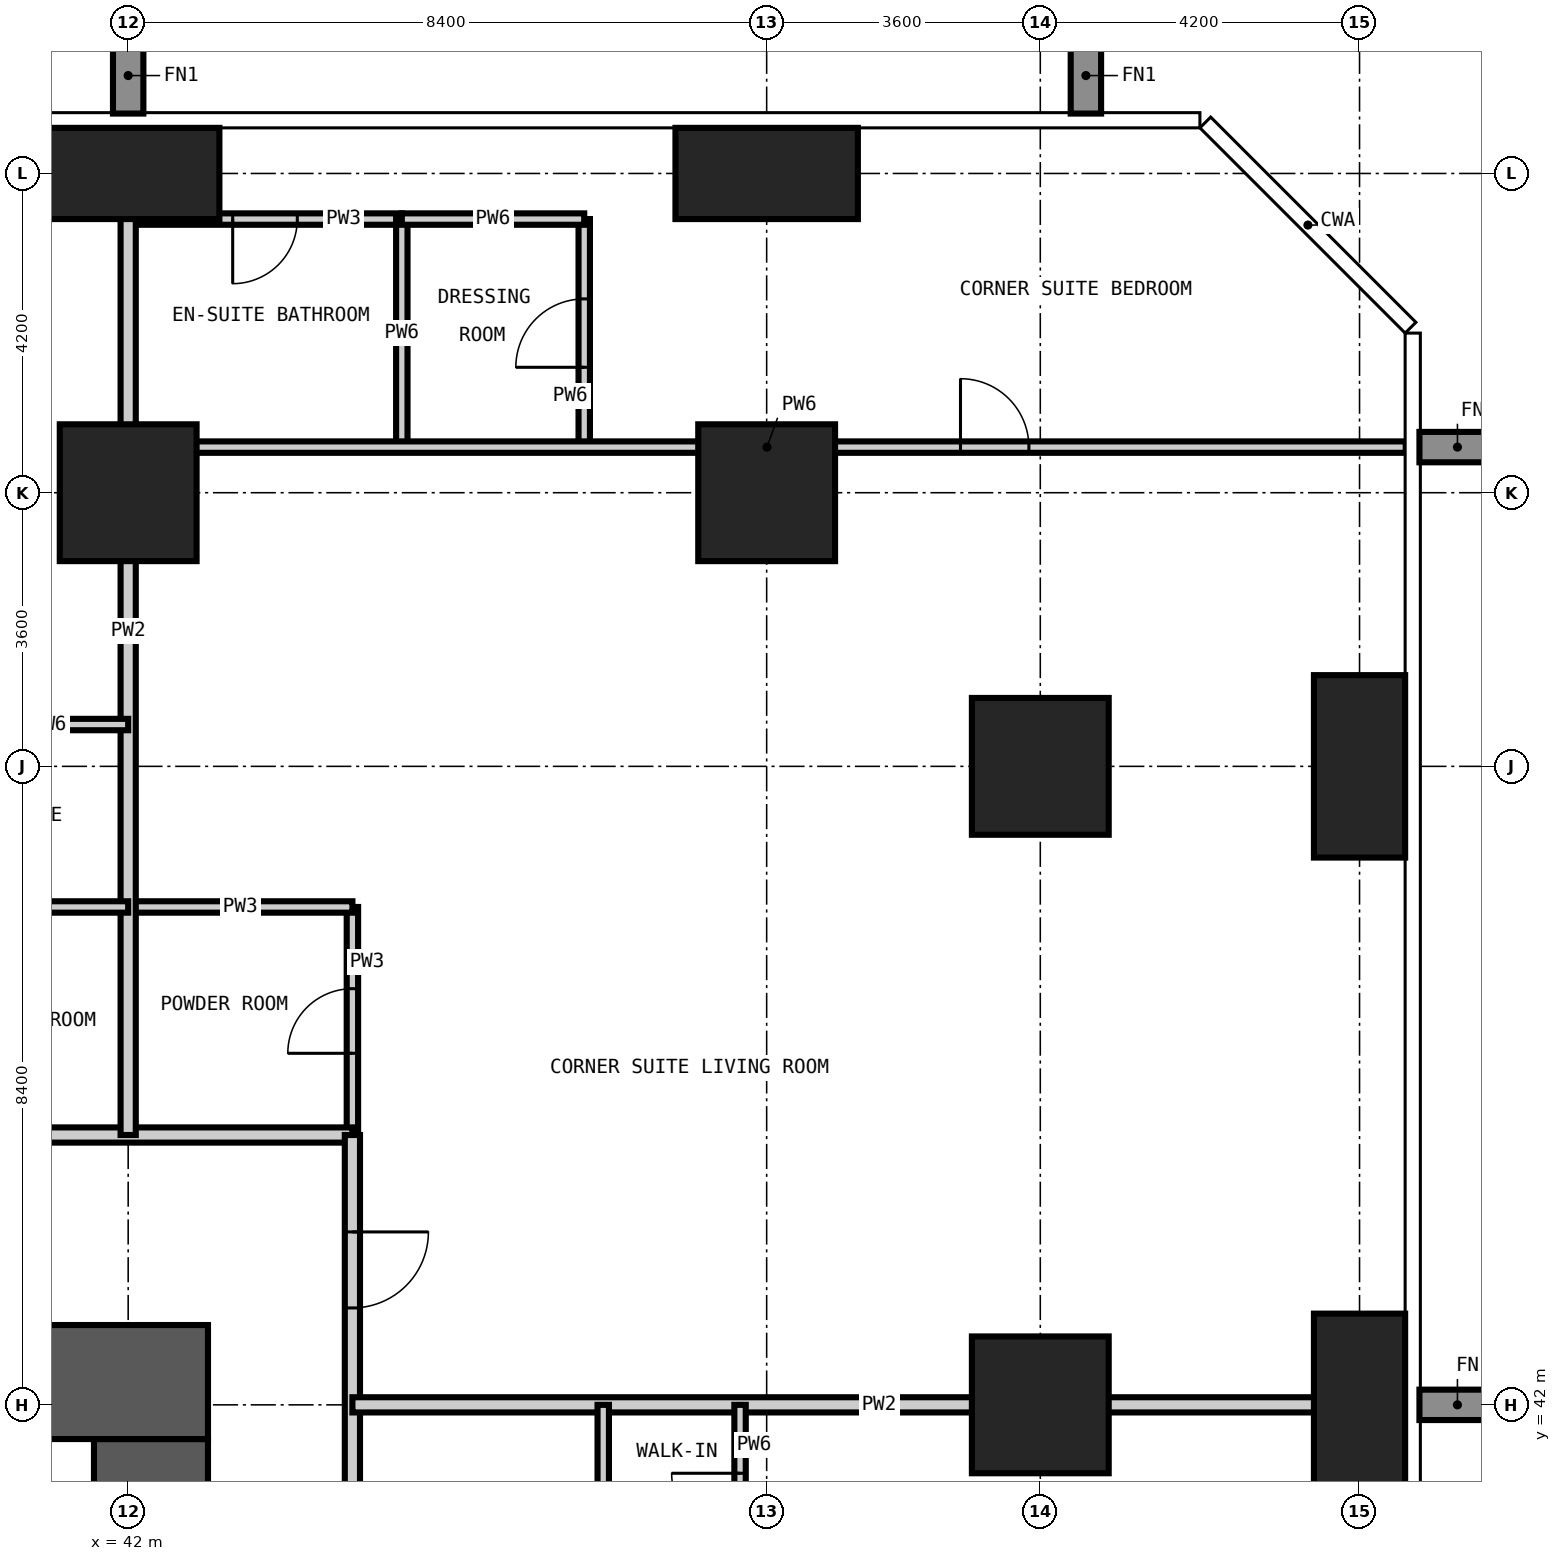
"""IFC4 building model, lengths in metres.
Left out: names, types, materials, properties, quantities, classifications, styles, units other than length and angle.
Written with IfcOpenShell. Run it as: python <this file> out.ifc"""

import sys

from ifc_helpers import new_model, si_unit, direction, frame, frame_2d, origin, origin_2d, place, context, subcontext, project, spatial, rectangle, extrude, element, fill, save


model = new_model("IFC4")
c1 = context("Model", 3, precision=1e-05, world=origin(), true_north=direction((0.0, 1.0)))
c2 = subcontext(c1, "Body", "Model", "MODEL_VIEW")
j1 = project(units=[si_unit("LENGTHUNIT", "METRE"), si_unit("PLANEANGLEUNIT", "RADIAN")], contexts=[c1])
p1 = place(None, origin())
s1 = spatial("IfcSite", under=j1, at=p1, CompositionType="ELEMENT")
p2 = place(p1, origin())
s2 = spatial("IfcBuilding", under=s1, at=p2, CompositionType="ELEMENT")
p3 = place(p2, frame((0.0, 0.0, 52.2)))
s3 = spatial("IfcBuildingStorey", under=s2, at=p3, CompositionType="ELEMENT", Elevation=52.2)
p4 = place(p3, frame((42.0, 54.0, -0.35), z_axis=(0.0, 0.0, 1.0), x_axis=(1.0, 0.0, 0.0)))
e1 = element("IfcColumn", 1, at=p4, inside=s3, PredefinedType="COLUMN", context=c2, shape_type="SweptSolid", body=[
    extrude(rectangle(XDim=1.8, YDim=1.8, at=origin_2d()), origin(), (0.0, 0.0, 1.0), 3.6),
])
p5 = place(p3, frame((42.0, 58.2, -0.35), z_axis=(0.0, 0.0, 1.0), x_axis=(1.0, 0.0, 0.0)))
e2 = element("IfcColumn", 2, at=p5, inside=s3, PredefinedType="COLUMN", context=c2, shape_type="SweptSolid", body=[
    extrude(rectangle(XDim=2.4, YDim=1.2, at=origin_2d()), origin(), (0.0, 0.0, 1.0), 3.6),
])
p6 = place(p3, frame((50.4, 54.0, -0.35), z_axis=(0.0, 0.0, 1.0), x_axis=(1.0, 0.0, 0.0)))
e3 = element("IfcColumn", 3, at=p6, inside=s3, PredefinedType="COLUMN", context=c2, shape_type="SweptSolid", body=[
    extrude(rectangle(XDim=1.8, YDim=1.8, at=origin_2d()), origin(), (0.0, 0.0, 1.0), 3.6),
])
p7 = place(p3, frame((50.4, 58.2, -0.35), z_axis=(0.0, 0.0, 1.0), x_axis=(1.0, 0.0, 0.0)))
e4 = element("IfcColumn", 4, at=p7, inside=s3, PredefinedType="COLUMN", context=c2, shape_type="SweptSolid", body=[
    extrude(rectangle(XDim=2.4, YDim=1.2, at=origin_2d()), origin(), (0.0, 0.0, 1.0), 3.6),
])
for number, where, z_axis, x_axis in (
    (5, (54.0, 42.0, -0.35), (0.0, 0.0, 1.0), (1.0, 0.0, 0.0)),
    (6, (54.0, 50.4, -0.35), (0.0, 0.0, 1.0), (1.0, 0.0, 0.0)),
):
    element("IfcColumn", number, at=place(p3, frame(where, z_axis=z_axis, x_axis=x_axis)), inside=s3, PredefinedType="COLUMN", context=c2, shape_type="SweptSolid", body=[
        extrude(rectangle(XDim=1.8, YDim=1.8, at=origin_2d()), origin(), (0.0, 0.0, 1.0), 3.6),
    ])
for number, where, z_axis, x_axis in (
    (7, (58.2, 42.0, -0.35), (0.0, 0.0, 1.0), (1.0, 0.0, 0.0)),
    (8, (58.2, 50.4, -0.35), (0.0, 0.0, 1.0), (1.0, 0.0, 0.0)),
):
    element("IfcColumn", number, at=place(p3, frame(where, z_axis=z_axis, x_axis=x_axis)), inside=s3, PredefinedType="COLUMN", context=c2, shape_type="SweptSolid", body=[
        extrude(rectangle(XDim=1.2, YDim=2.4, at=origin_2d()), origin(), (0.0, 0.0, 1.0), 3.6),
    ])
p8 = place(p3, frame((42.3, 17.25, -0.35), z_axis=(0.0, 0.0, 1.0), x_axis=(0.0, 1.0, 0.0)))
e9 = element("IfcWall", 9, at=p8, inside=s3, PredefinedType="SHEAR", context=c2, shape_type="SweptSolid", body=[
    extrude(rectangle(XDim=24.3, YDim=1.5, at=frame_2d((12.15, 0.0))), origin(), (0.0, 0.0, 1.0), 3.6),
])
p9 = place(p8, frame((0.35, 0.0, 0.35)))
e10 = element("IfcOpeningElement", 10, at=p9, cuts=e9, PredefinedType="OPENING", context=c2, shape_type="SweptSolid", body=[
    extrude(rectangle(XDim=1.2, YDim=2.2, at=frame_2d((0.6, 1.1))), frame((0.0, 0.76, 0.0), z_axis=(0.0, -1.0, 0.0), x_axis=(1.0, 0.0, 0.0)), (0.0, 0.0, 1.0), 1.52),
])
p10 = place(p8, frame((11.65, 0.0, 0.35)))
e11 = element("IfcOpeningElement", 11, at=p10, cuts=e9, PredefinedType="OPENING", context=c2, shape_type="SweptSolid", body=[
    extrude(rectangle(XDim=1.0, YDim=2.1, at=frame_2d((0.5, 1.05))), frame((0.0, 0.76, 0.0), z_axis=(0.0, -1.0, 0.0), x_axis=(1.0, 0.0, 0.0)), (0.0, 0.0, 1.0), 1.52),
])
p11 = place(p8, frame((20.05, 0.0, 0.35)))
e12 = element("IfcOpeningElement", 12, at=p11, cuts=e9, PredefinedType="OPENING", context=c2, shape_type="SweptSolid", body=[
    extrude(rectangle(XDim=1.0, YDim=2.1, at=frame_2d((0.5, 1.05))), frame((0.0, 0.76, 0.0), z_axis=(0.0, -1.0, 0.0), x_axis=(1.0, 0.0, 0.0)), (0.0, 0.0, 1.0), 1.52),
])
p12 = place(p3, frame((43.05, 42.3, -0.35), z_axis=(0.0, 0.0, 1.0), x_axis=(-1.0, 0.0, 0.0)))
e13 = element("IfcWall", 13, at=p12, inside=s3, PredefinedType="SHEAR", context=c2, shape_type="SweptSolid", body=[
    extrude(rectangle(XDim=27.3, YDim=1.5, at=frame_2d((13.65, 0.0))), origin(), (0.0, 0.0, 1.0), 3.6),
])
p13 = place(p12, frame((21.55, 0.0, 0.35)))
e14 = element("IfcOpeningElement", 14, at=p13, cuts=e13, PredefinedType="OPENING", context=c2, shape_type="SweptSolid", body=[
    extrude(rectangle(XDim=1.0, YDim=2.1, at=frame_2d((0.5, 1.05))), frame((0.0, 0.76, 0.0), z_axis=(0.0, -1.0, 0.0), x_axis=(1.0, 0.0, 0.0)), (0.0, 0.0, 1.0), 1.52),
])
p14 = place(p12, frame((10.95, 0.0, 0.35)))
e15 = element("IfcOpeningElement", 15, at=p14, cuts=e13, PredefinedType="OPENING", context=c2, shape_type="SweptSolid", body=[
    extrude(rectangle(XDim=1.2, YDim=2.2, at=frame_2d((0.6, 1.1))), frame((0.0, 0.76, 0.0), z_axis=(0.0, -1.0, 0.0), x_axis=(1.0, 0.0, 0.0)), (0.0, 0.0, 1.0), 1.52),
])
p15 = place(p3, frame((44.95, 45.55, 0.0), z_axis=(0.0, 0.0, 1.0), x_axis=(0.0, 1.0, 0.0)))
e16 = element("IfcWall", 16, at=p15, inside=s3, PredefinedType="PARTITIONING", context=c2, shape_type="SweptSolid", body=[
    extrude(rectangle(XDim=3.0, YDim=0.15, at=frame_2d((1.5, 0.0))), origin(), (0.0, 0.0, 1.0), 3.25),
])
p16 = place(p15, frame((1.075, 0.0, 0.0)))
e17 = element("IfcOpeningElement", 17, at=p16, cuts=e16, PredefinedType="OPENING", context=c2, shape_type="SweptSolid", body=[
    extrude(rectangle(XDim=0.85, YDim=2.1, at=frame_2d((0.425, 1.05))), frame((0.0, 0.085, 0.0), z_axis=(0.0, -1.0, 0.0), x_axis=(1.0, 0.0, 0.0)), (0.0, 0.0, 1.0), 0.17),
])
p17 = place(p3, frame((42.0, 48.55, 0.0), z_axis=(0.0, 0.0, 1.0), x_axis=(1.0, 0.0, 0.0)))
e18 = element("IfcWall", 18, at=p17, inside=s3, PredefinedType="PARTITIONING", context=c2, shape_type="SweptSolid", body=[
    extrude(rectangle(XDim=2.95, YDim=0.15, at=frame_2d((1.475, 0.0))), origin(), (0.0, 0.0, 1.0), 3.25),
])
p18 = place(p3, frame((42.0, 57.6, 0.0), z_axis=(0.0, 0.0, 1.0), x_axis=(1.0, 0.0, 0.0)))
e19 = element("IfcWall", 19, at=p18, inside=s3, PredefinedType="PARTITIONING", context=c2, shape_type="SweptSolid", body=[
    extrude(rectangle(XDim=3.6, YDim=0.15, at=frame_2d((1.8, 0.0))), origin(), (0.0, 0.0, 1.0), 3.25),
])
p19 = place(p18, frame((1.375, 0.0, 0.0)))
e20 = element("IfcOpeningElement", 20, at=p19, cuts=e19, PredefinedType="OPENING", context=c2, shape_type="SweptSolid", body=[
    extrude(rectangle(XDim=0.85, YDim=2.1, at=frame_2d((0.425, 1.05))), frame((0.0, 0.085, 0.0), z_axis=(0.0, -1.0, 0.0), x_axis=(1.0, 0.0, 0.0)), (0.0, 0.0, 1.0), 0.17),
])
p20 = place(p3, frame((12.65, 45.55, 0.0), z_axis=(0.0, 0.0, 1.0), x_axis=(1.0, 0.0, 0.0)))
e21 = element("IfcWall", 21, at=p20, inside=s3, PredefinedType="PARTITIONING", context=c2, shape_type="SweptSolid", body=[
    extrude(rectangle(XDim=32.3, YDim=0.2, at=frame_2d((16.15, 0.0))), origin(), (0.0, 0.0, 1.0), 3.25),
])
p21 = place(p20, frame((6.95, 0.0, 0.0)))
e22 = element("IfcOpeningElement", 22, at=p21, cuts=e21, PredefinedType="OPENING", context=c2, shape_type="SweptSolid", body=[
    extrude(rectangle(XDim=1.0, YDim=2.2, at=frame_2d((0.5, 1.1))), frame((0.0, 0.11, 0.0), z_axis=(0.0, -1.0, 0.0), x_axis=(1.0, 0.0, 0.0)), (0.0, 0.0, 1.0), 0.22),
])
p22 = place(p20, frame((15.35, 0.0, 0.0)))
e23 = element("IfcOpeningElement", 23, at=p22, cuts=e21, PredefinedType="OPENING", context=c2, shape_type="SweptSolid", body=[
    extrude(rectangle(XDim=1.0, YDim=2.2, at=frame_2d((0.5, 1.1))), frame((0.0, 0.11, 0.0), z_axis=(0.0, -1.0, 0.0), x_axis=(1.0, 0.0, 0.0)), (0.0, 0.0, 1.0), 0.22),
])
p23 = place(p20, frame((23.75, 0.0, 0.0)))
e24 = element("IfcOpeningElement", 24, at=p23, cuts=e21, PredefinedType="OPENING", context=c2, shape_type="SweptSolid", body=[
    extrude(rectangle(XDim=1.0, YDim=2.2, at=frame_2d((0.5, 1.1))), frame((0.0, 0.11, 0.0), z_axis=(0.0, -1.0, 0.0), x_axis=(1.0, 0.0, 0.0)), (0.0, 0.0, 1.0), 0.22),
])
p24 = place(p3, frame((44.95, 45.55, 0.0), z_axis=(0.0, 0.0, 1.0), x_axis=(0.0, -1.0, 0.0)))
e25 = element("IfcWall", 25, at=p24, inside=s3, PredefinedType="PARTITIONING", context=c2, shape_type="SweptSolid", body=[
    extrude(rectangle(XDim=32.9, YDim=0.2, at=frame_2d((16.45, 0.0))), origin(), (0.0, 0.0, 1.0), 3.25),
])
p25 = place(p24, frame((24.8, 0.0, 0.0)))
e26 = element("IfcOpeningElement", 26, at=p25, cuts=e25, PredefinedType="OPENING", context=c2, shape_type="SweptSolid", body=[
    extrude(rectangle(XDim=1.0, YDim=2.2, at=frame_2d((0.5, 1.1))), frame((0.0, 0.11, 0.0), z_axis=(0.0, -1.0, 0.0), x_axis=(1.0, 0.0, 0.0)), (0.0, 0.0, 1.0), 0.22),
])
p26 = place(p24, frame((19.85, 0.0, 0.0)))
e27 = element("IfcOpeningElement", 27, at=p26, cuts=e25, PredefinedType="OPENING", context=c2, shape_type="SweptSolid", body=[
    extrude(rectangle(XDim=1.0, YDim=2.2, at=frame_2d((0.5, 1.1))), frame((0.0, 0.11, 0.0), z_axis=(0.0, -1.0, 0.0), x_axis=(1.0, 0.0, 0.0)), (0.0, 0.0, 1.0), 0.22),
])
p27 = place(p24, frame((11.45, 0.0, 0.0)))
e28 = element("IfcOpeningElement", 28, at=p27, cuts=e25, PredefinedType="OPENING", context=c2, shape_type="SweptSolid", body=[
    extrude(rectangle(XDim=1.0, YDim=2.2, at=frame_2d((0.5, 1.1))), frame((0.0, 0.11, 0.0), z_axis=(0.0, -1.0, 0.0), x_axis=(1.0, 0.0, 0.0)), (0.0, 0.0, 1.0), 0.22),
])
p28 = place(p24, frame((6.5, 0.0, 0.0)))
e29 = element("IfcOpeningElement", 29, at=p28, cuts=e25, PredefinedType="OPENING", context=c2, shape_type="SweptSolid", body=[
    extrude(rectangle(XDim=1.0, YDim=2.2, at=frame_2d((0.5, 1.1))), frame((0.0, 0.11, 0.0), z_axis=(0.0, -1.0, 0.0), x_axis=(1.0, 0.0, 0.0)), (0.0, 0.0, 1.0), 0.22),
])
p29 = place(p24, frame((30.325, 0.0, 0.0)))
e30 = element("IfcOpeningElement", 30, at=p29, cuts=e25, PredefinedType="OPENING", context=c2, shape_type="SweptSolid", body=[
    extrude(rectangle(XDim=1.0, YDim=2.2, at=frame_2d((0.5, 1.1))), frame((0.0, 0.11, 0.0), z_axis=(0.0, -1.0, 0.0), x_axis=(1.0, 0.0, 0.0)), (0.0, 0.0, 1.0), 0.22),
])
p30 = place(p24, frame((1.275, 0.0, 0.0)))
e31 = element("IfcOpeningElement", 31, at=p30, cuts=e25, PredefinedType="OPENING", context=c2, shape_type="SweptSolid", body=[
    extrude(rectangle(XDim=1.0, YDim=2.2, at=frame_2d((0.5, 1.1))), frame((0.0, 0.11, 0.0), z_axis=(0.0, -1.0, 0.0), x_axis=(1.0, 0.0, 0.0)), (0.0, 0.0, 1.0), 0.22),
])
p31 = place(p3, frame((42.0, 45.55, 0.0), z_axis=(0.0, 0.0, 1.0), x_axis=(0.0, 1.0, 0.0)))
e32 = element("IfcWall", 32, at=p31, inside=s3, PredefinedType="PARTITIONING", context=c2, shape_type="SweptSolid", body=[
    extrude(rectangle(XDim=13.258, YDim=0.2, at=frame_2d((6.629, 0.0))), origin(), (0.0, 0.0, 1.0), 3.25),
])
p32 = place(p3, frame((44.95, 42.0, 0.0), z_axis=(0.0, 0.0, 1.0), x_axis=(1.0, 0.0, 0.0)))
e33 = element("IfcWall", 33, at=p32, inside=s3, PredefinedType="PARTITIONING", context=c2, shape_type="SweptSolid", body=[
    extrude(rectangle(XDim=13.858, YDim=0.2, at=frame_2d((6.929, 0.0))), origin(), (0.0, 0.0, 1.0), 3.25),
])
p33 = place(p3, frame((45.6, 54.6, 0.0), z_axis=(0.0, 0.0, 1.0), x_axis=(0.0, 1.0, 0.0)))
e34 = element("IfcWall", 34, at=p33, inside=s3, PredefinedType="PARTITIONING", context=c2, shape_type="SweptSolid", body=[
    extrude(rectangle(XDim=3.0, YDim=0.15, at=frame_2d((1.5, 0.0))), origin(), (0.0, 0.0, 1.0), 3.25),
])
p34 = place(p3, frame((48.0, 54.6, 0.0), z_axis=(0.0, 0.0, 1.0), x_axis=(0.0, 1.0, 0.0)))
e35 = element("IfcWall", 35, at=p34, inside=s3, PredefinedType="PARTITIONING", context=c2, shape_type="SweptSolid", body=[
    extrude(rectangle(XDim=3.0, YDim=0.15, at=frame_2d((1.5, 0.0))), origin(), (0.0, 0.0, 1.0), 3.25),
])
p35 = place(p34, frame((1.05, 0.0, 0.0)))
e36 = element("IfcOpeningElement", 36, at=p35, cuts=e35, PredefinedType="OPENING", context=c2, shape_type="SweptSolid", body=[
    extrude(rectangle(XDim=0.9, YDim=2.1, at=frame_2d((0.45, 1.05))), frame((0.0, 0.085, 0.0), z_axis=(0.0, -1.0, 0.0), x_axis=(1.0, 0.0, 0.0)), (0.0, 0.0, 1.0), 0.17),
])
p36 = place(p3, frame((48.25, 39.3, 0.0), z_axis=(0.0, 0.0, 1.0), x_axis=(0.0, 1.0, 0.0)))
e37 = element("IfcWall", 37, at=p36, inside=s3, PredefinedType="PARTITIONING", context=c2, shape_type="SweptSolid", body=[
    extrude(rectangle(XDim=2.7, YDim=0.15, at=frame_2d((1.35, 0.0))), origin(), (0.0, 0.0, 1.0), 3.25),
])
p37 = place(p3, frame((50.05, 39.3, 0.0), z_axis=(0.0, 0.0, 1.0), x_axis=(0.0, 1.0, 0.0)))
e38 = element("IfcWall", 38, at=p37, inside=s3, PredefinedType="PARTITIONING", context=c2, shape_type="SweptSolid", body=[
    extrude(rectangle(XDim=2.7, YDim=0.15, at=frame_2d((1.35, 0.0))), origin(), (0.0, 0.0, 1.0), 3.25),
])
p38 = place(p37, frame((0.9, 0.0, 0.0)))
e39 = element("IfcOpeningElement", 39, at=p38, cuts=e38, PredefinedType="OPENING", context=c2, shape_type="SweptSolid", body=[
    extrude(rectangle(XDim=0.9, YDim=2.1, at=frame_2d((0.45, 1.05))), frame((0.0, 0.085, 0.0), z_axis=(0.0, -1.0, 0.0), x_axis=(1.0, 0.0, 0.0)), (0.0, 0.0, 1.0), 0.17),
])
p39 = place(p3, frame((37.8, 48.55, 0.0), z_axis=(0.0, 0.0, 1.0), x_axis=(1.0, 0.0, 0.0)))
e40 = element("IfcWall", 40, at=p39, inside=s3, PredefinedType="PARTITIONING", context=c2, shape_type="SweptSolid", body=[
    extrude(rectangle(XDim=4.2, YDim=0.15, at=frame_2d((2.1, 0.0))), origin(), (0.0, 0.0, 1.0), 3.25),
])
p40 = place(p3, frame((37.8, 50.95, 0.0), z_axis=(0.0, 0.0, 1.0), x_axis=(1.0, 0.0, 0.0)))
e41 = element("IfcWall", 41, at=p40, inside=s3, PredefinedType="PARTITIONING", context=c2, shape_type="SweptSolid", body=[
    extrude(rectangle(XDim=4.2, YDim=0.15, at=frame_2d((2.1, 0.0))), origin(), (0.0, 0.0, 1.0), 3.25),
])
p41 = place(p40, frame((1.65, 0.0, 0.0)))
e42 = element("IfcOpeningElement", 42, at=p41, cuts=e41, PredefinedType="OPENING", context=c2, shape_type="SweptSolid", body=[
    extrude(rectangle(XDim=0.9, YDim=2.1, at=frame_2d((0.45, 1.05))), frame((0.0, 0.085, 0.0), z_axis=(0.0, -1.0, 0.0), x_axis=(1.0, 0.0, 0.0)), (0.0, 0.0, 1.0), 0.17),
])
p42 = place(p3, frame((42.0, 54.6, 0.0), z_axis=(0.0, 0.0, 1.0), x_axis=(1.0, 0.0, 0.0)))
e43 = element("IfcWall", 43, at=p42, inside=s3, PredefinedType="PARTITIONING", context=c2, shape_type="SweptSolid", body=[
    extrude(rectangle(XDim=16.808, YDim=0.15, at=frame_2d((8.404, 0.0))), origin(), (0.0, 0.0, 1.0), 3.25),
])
p43 = place(p42, frame((10.95, 0.0, 0.0)))
e44 = element("IfcOpeningElement", 44, at=p43, cuts=e43, PredefinedType="OPENING", context=c2, shape_type="SweptSolid", body=[
    extrude(rectangle(XDim=0.9, YDim=2.1, at=frame_2d((0.45, 1.05))), frame((0.0, 0.085, 0.0), z_axis=(0.0, -1.0, 0.0), x_axis=(1.0, 0.0, 0.0)), (0.0, 0.0, 1.0), 0.17),
])
p44 = place(p3, frame((45.6, 57.6, 0.0), z_axis=(0.0, 0.0, 1.0), x_axis=(1.0, 0.0, 0.0)))
e45 = element("IfcWall", 45, at=p44, inside=s3, PredefinedType="PARTITIONING", context=c2, shape_type="SweptSolid", body=[
    extrude(rectangle(XDim=2.4, YDim=0.15, at=frame_2d((1.2, 0.0))), origin(), (0.0, 0.0, 1.0), 3.25),
])
p45 = place(p38, origin())
e46 = element("IfcDoor", 46, at=p45, inside=s3, OperationType="SINGLE_SWING_RIGHT", PredefinedType="DOOR", context=c2, shape_type="SweptSolid", body=[
    extrude(rectangle(XDim=0.9, YDim=2.1, at=frame_2d((0.45, 1.05))), frame((0.0, 0.025, 0.0), z_axis=(0.0, -1.0, 0.0), x_axis=(1.0, 0.0, 0.0)), (0.0, 0.0, 1.0), 0.05),
])
fill(e39, e46)
p46 = place(p30, origin())
e47 = element("IfcDoor", 47, at=p46, inside=s3, OperationType="SINGLE_SWING_LEFT", PredefinedType="DOOR", context=c2, shape_type="SweptSolid", body=[
    extrude(rectangle(XDim=1.0, YDim=2.2, at=frame_2d((0.5, 1.1))), frame((0.0, 0.025, 0.0), z_axis=(0.0, -1.0, 0.0), x_axis=(1.0, 0.0, 0.0)), (0.0, 0.0, 1.0), 0.05),
])
fill(e31, e47)
p47 = place(p16, origin())
e48 = element("IfcDoor", 48, at=p47, inside=s3, OperationType="SINGLE_SWING_LEFT", PredefinedType="DOOR", context=c2, shape_type="SweptSolid", body=[
    extrude(rectangle(XDim=0.85, YDim=2.1, at=frame_2d((0.425, 1.05))), frame((0.0, 0.025, 0.0), z_axis=(0.0, -1.0, 0.0), x_axis=(1.0, 0.0, 0.0)), (0.0, 0.0, 1.0), 0.05),
])
fill(e17, e48)
p48 = place(p43, origin())
e49 = element("IfcDoor", 49, at=p48, inside=s3, OperationType="SINGLE_SWING_LEFT", PredefinedType="DOOR", context=c2, shape_type="SweptSolid", body=[
    extrude(rectangle(XDim=0.9, YDim=2.1, at=frame_2d((0.45, 1.05))), frame((0.0, 0.025, 0.0), z_axis=(0.0, -1.0, 0.0), x_axis=(1.0, 0.0, 0.0)), (0.0, 0.0, 1.0), 0.05),
])
fill(e44, e49)
p49 = place(p19, frame((0.85, 0.0, 0.0), z_axis=(0.0, 0.0, 1.0), x_axis=(-1.0, 0.0, 0.0)))
e50 = element("IfcDoor", 50, at=p49, inside=s3, OperationType="SINGLE_SWING_RIGHT", PredefinedType="DOOR", context=c2, shape_type="SweptSolid", body=[
    extrude(rectangle(XDim=0.85, YDim=2.1, at=frame_2d((0.425, 1.05))), frame((0.0, 0.025, 0.0), z_axis=(0.0, -1.0, 0.0), x_axis=(1.0, 0.0, 0.0)), (0.0, 0.0, 1.0), 0.05),
])
fill(e20, e50)
p50 = place(p35, origin())
e51 = element("IfcDoor", 51, at=p50, inside=s3, OperationType="SINGLE_SWING_LEFT", PredefinedType="DOOR", context=c2, shape_type="SweptSolid", body=[
    extrude(rectangle(XDim=0.9, YDim=2.1, at=frame_2d((0.45, 1.05))), frame((0.0, 0.025, 0.0), z_axis=(0.0, -1.0, 0.0), x_axis=(1.0, 0.0, 0.0)), (0.0, 0.0, 1.0), 0.05),
])
fill(e36, e51)
save(model, sys.argv[1])
